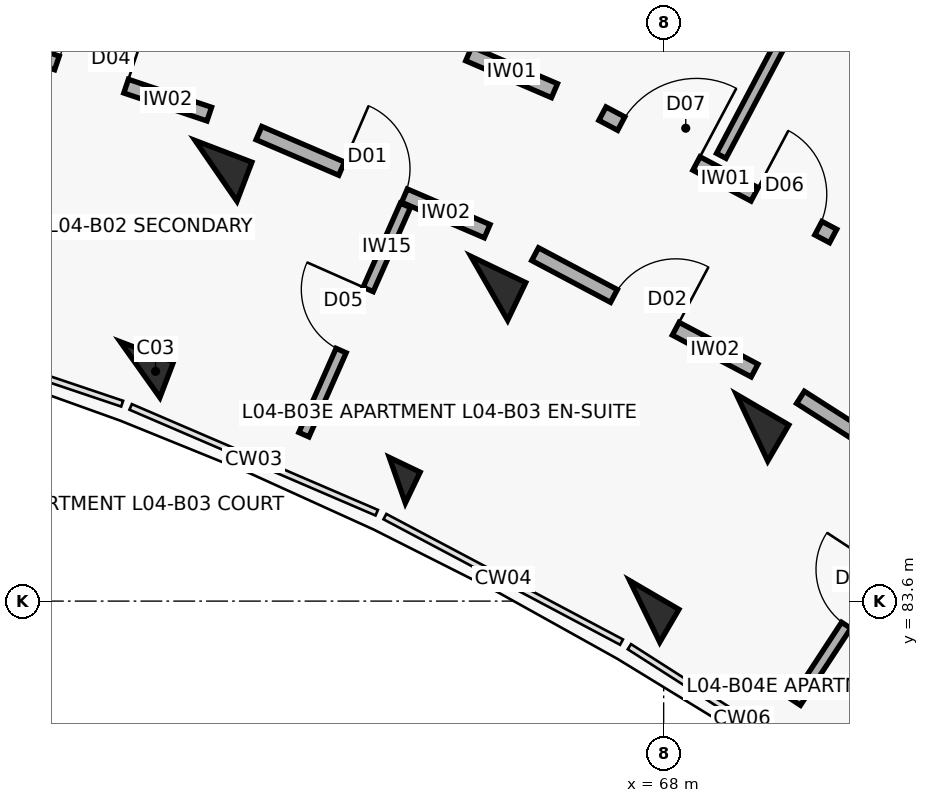
"""IFC4 building model, lengths in metres.
Left out: names, types, materials, properties, quantities, classifications, styles, units other than length and angle.
Written with IfcOpenShell. Run it as: python <this file> out.ifc"""

import sys

from ifc_helpers import new_model, si_unit, direction, frame, frame_2d, origin, origin_2d, place, context, subcontext, project, spatial, rectangle, extrude, element, fill, save


model = new_model("IFC4")
c1 = context("Model", 3, precision=1e-05, world=origin(), true_north=direction((0.0, 1.0)))
c2 = subcontext(c1, "Body", "Model", "MODEL_VIEW")
j1 = project(units=[si_unit("LENGTHUNIT", "METRE"), si_unit("PLANEANGLEUNIT", "RADIAN")], contexts=[c1])
p1 = place(None, origin())
s1 = spatial("IfcSite", under=j1, at=p1, CompositionType="ELEMENT")
p2 = place(p1, origin())
s2 = spatial("IfcBuilding", under=s1, at=p2, CompositionType="ELEMENT")
p3 = place(p2, frame((0.0, 0.0, 14.3)))
s3 = spatial("IfcBuildingStorey", under=s2, at=p3, CompositionType="ELEMENT", Elevation=14.3)
p4 = place(p3, frame((61.111, 86.646, 0.0), z_axis=(0.0, 0.0, 1.0), x_axis=(0.357064076459, 0.934079892355, 0.0)))
e1 = element("IfcColumn", 1, at=p4, inside=s3, PredefinedType="COLUMN", context=c2, shape_type="SweptSolid", body=[
    extrude(rectangle(XDim=0.5, YDim=0.75, at=origin_2d()), origin(), (0.0, 0.0, 1.0), 3.1),
])
p5 = place(p3, frame((62.111, 89.261, 0.0), z_axis=(0.0, 0.0, 1.0), x_axis=(0.357064076459, 0.934079892355, 0.0)))
e2 = element("IfcColumn", 2, at=p5, inside=s3, PredefinedType="COLUMN", context=c2, shape_type="SweptSolid", body=[
    extrude(rectangle(XDim=0.55, YDim=0.8, at=origin_2d()), origin(), (0.0, 0.0, 1.0), 3.1),
])
p6 = place(p3, frame((64.496, 85.191, 0.0), z_axis=(0.0, 0.0, 1.0), x_axis=(0.432085748802, 0.901832526405, 0.0)))
e3 = element("IfcColumn", 3, at=p6, inside=s3, PredefinedType="COLUMN", context=c2, shape_type="SweptSolid", body=[
    extrude(rectangle(XDim=0.45, YDim=0.45, at=origin_2d()), origin(), (0.0, 0.0, 1.0), 3.1),
])
p7 = place(p3, frame((65.706, 87.716, 0.0), z_axis=(0.0, 0.0, 1.0), x_axis=(0.432085748802, 0.901832526405, 0.0)))
e4 = element("IfcColumn", 4, at=p7, inside=s3, PredefinedType="COLUMN", context=c2, shape_type="SweptSolid", body=[
    extrude(rectangle(XDim=0.55, YDim=0.8, at=origin_2d()), origin(), (0.0, 0.0, 1.0), 3.1),
])
p8 = place(p3, frame((67.751, 83.464, 0.0), z_axis=(0.0, 0.0, 1.0), x_axis=(0.504226211181, 0.863571611366, 0.0)))
e5 = element("IfcColumn", 5, at=p8, inside=s3, PredefinedType="COLUMN", context=c2, shape_type="SweptSolid", body=[
    extrude(rectangle(XDim=0.5, YDim=0.75, at=origin_2d()), origin(), (0.0, 0.0, 1.0), 3.1),
])
p9 = place(p3, frame((69.163, 85.882, 0.0), z_axis=(0.0, 0.0, 1.0), x_axis=(0.504226211181, 0.863571611366, 0.0)))
e6 = element("IfcColumn", 6, at=p9, inside=s3, PredefinedType="COLUMN", context=c2, shape_type="SweptSolid", body=[
    extrude(rectangle(XDim=0.55, YDim=0.8, at=origin_2d()), origin(), (0.0, 0.0, 1.0), 3.1),
])
p10 = place(p3, frame((58.923, 91.049, 0.0), z_axis=(0.0, 0.0, 1.0), x_axis=(0.94787351033, -0.318646839643, 0.0)))
e7 = element("IfcWall", 7, at=p10, inside=s3, PredefinedType="SOLIDWALL", context=c2, shape_type="SweptSolid", body=[
    extrude(rectangle(XDim=3.269, YDim=0.19, at=frame_2d((1.634, 0.0))), origin(), (0.0, 0.0, 1.0), 2.08),
])
p11 = place(p10, frame((1.154, 0.0, 0.0)))
e8 = element("IfcOpeningElement", 8, at=p11, cuts=e7, PredefinedType="OPENING", context=c2, shape_type="SweptSolid", body=[
    extrude(rectangle(XDim=0.96, YDim=2.1, at=frame_2d((0.48, 1.05))), frame((0.0, 0.105, 0.0), z_axis=(0.0, -1.0, 0.0), x_axis=(1.0, 0.0, 0.0)), (0.0, 0.0, 1.0), 0.21),
])
p12 = place(p3, frame((63.407, 91.673, 0.0), z_axis=(0.0, 0.0, 1.0), x_axis=(0.918718172399, -0.394913813008, 0.0)))
e9 = element("IfcWall", 9, at=p12, inside=s3, PredefinedType="SOLIDWALL", context=c2, shape_type="SweptSolid", body=[
    extrude(rectangle(XDim=3.436, YDim=0.2, at=frame_2d((1.718, 0.0))), origin(), (0.0, 0.0, 1.0), 2.08),
])
p13 = place(p12, frame((1.228, 0.0, 0.0)))
e10 = element("IfcOpeningElement", 10, at=p13, cuts=e9, PredefinedType="OPENING", context=c2, shape_type="SweptSolid", body=[
    extrude(rectangle(XDim=0.98, YDim=2.15, at=frame_2d((0.49, 1.075))), frame((0.0, 0.11, 0.0), z_axis=(0.0, -1.0, 0.0), x_axis=(1.0, 0.0, 0.0)), (0.0, 0.0, 1.0), 0.22),
])
p14 = place(p3, frame((62.675, 89.758, 0.0), z_axis=(0.0, 0.0, 1.0), x_axis=(0.918723391052, -0.394901672235, 0.0)))
e11 = element("IfcWall", 11, at=p14, inside=s3, PredefinedType="SOLIDWALL", context=c2, shape_type="SweptSolid", body=[
    extrude(rectangle(XDim=3.269, YDim=0.19, at=frame_2d((1.634, 0.0))), origin(), (0.0, 0.0, 1.0), 2.08),
])
p15 = place(p14, frame((1.184, 0.0, 0.0)))
e12 = element("IfcOpeningElement", 12, at=p15, cuts=e11, PredefinedType="OPENING", context=c2, shape_type="SweptSolid", body=[
    extrude(rectangle(XDim=0.9, YDim=2.1, at=frame_2d((0.45, 1.05))), frame((0.0, 0.105, 0.0), z_axis=(0.0, -1.0, 0.0), x_axis=(1.0, 0.0, 0.0)), (0.0, 0.0, 1.0), 0.21),
])
p16 = place(p3, frame((63.267, 85.79, 0.0), z_axis=(0.0, 0.0, 1.0), x_axis=(0.404545283439, 0.91451796792, 0.0)))
e13 = element("IfcWall", 13, at=p16, inside=s3, PredefinedType="PARTITIONING", context=c2, shape_type="SweptSolid", body=[
    extrude(rectangle(XDim=3.3, YDim=0.145, at=frame_2d((1.65, 0.0))), origin(), (0.0, 0.0, 1.0), 2.08),
])
p17 = place(p16, frame((1.21, 0.0, 0.0)))
e14 = element("IfcOpeningElement", 14, at=p17, cuts=e13, PredefinedType="OPENING", context=c2, shape_type="SweptSolid", body=[
    extrude(rectangle(XDim=0.88, YDim=2.1, at=frame_2d((0.44, 1.05))), frame((0.0, 0.083, 0.0), z_axis=(0.0, -1.0, 0.0), x_axis=(1.0, 0.0, 0.0)), (0.0, 0.0, 1.0), 0.165),
])
p18 = place(p3, frame((67.194, 90.014, 0.0), z_axis=(0.0, 0.0, 1.0), x_axis=(0.883410853063, -0.468599258099, 0.0)))
e15 = element("IfcWall", 15, at=p18, inside=s3, PredefinedType="SOLIDWALL", context=c2, shape_type="SweptSolid", body=[
    extrude(rectangle(XDim=3.436, YDim=0.2, at=frame_2d((1.718, 0.0))), origin(), (0.0, 0.0, 1.0), 2.08),
])
p19 = place(p18, frame((0.28, 0.0, 0.0)))
e16 = element("IfcOpeningElement", 16, at=p19, cuts=e15, PredefinedType="OPENING", context=c2, shape_type="SweptSolid", body=[
    extrude(rectangle(XDim=1.12, YDim=2.15, at=frame_2d((0.56, 1.075))), frame((0.0, 0.11, 0.0), z_axis=(0.0, -1.0, 0.0), x_axis=(1.0, 0.0, 0.0)), (0.0, 0.0, 1.0), 0.22),
])
p20 = place(p18, frame((2.266, 0.0, 0.0)))
e17 = element("IfcOpeningElement", 17, at=p20, cuts=e15, PredefinedType="OPENING", context=c2, shape_type="SweptSolid", body=[
    extrude(rectangle(XDim=0.95, YDim=2.1, at=frame_2d((0.475, 1.05))), frame((0.0, 0.11, 0.0), z_axis=(0.0, -1.0, 0.0), x_axis=(1.0, 0.0, 0.0)), (0.0, 0.0, 1.0), 0.22),
])
p21 = place(p3, frame((66.309, 88.165, 0.0), z_axis=(0.0, 0.0, 1.0), x_axis=(0.883444301944, -0.468536194293, 0.0)))
e18 = element("IfcWall", 18, at=p21, inside=s3, PredefinedType="SOLIDWALL", context=c2, shape_type="SweptSolid", body=[
    extrude(rectangle(XDim=3.269, YDim=0.19, at=frame_2d((1.634, 0.0))), origin(), (0.0, 0.0, 1.0), 2.08),
])
p22 = place(p21, frame((1.174, 0.0, 0.0)))
e19 = element("IfcOpeningElement", 19, at=p22, cuts=e18, PredefinedType="OPENING", context=c2, shape_type="SweptSolid", body=[
    extrude(rectangle(XDim=0.92, YDim=2.1, at=frame_2d((0.46, 1.05))), frame((0.0, 0.105, 0.0), z_axis=(0.0, -1.0, 0.0), x_axis=(1.0, 0.0, 0.0)), (0.0, 0.0, 1.0), 0.21),
])
p23 = place(p3, frame((68.758, 89.459, 0.0), z_axis=(0.0, 0.0, 1.0), x_axis=(0.467208910392, 0.884146952746, 0.0)))
e20 = element("IfcWall", 20, at=p23, inside=s3, PredefinedType="PARTITIONING", context=c2, shape_type="SweptSolid", body=[
    extrude(rectangle(XDim=7.95, YDim=0.14, at=frame_2d((3.975, 0.0))), origin(), (0.0, 0.0, 1.0), 2.08),
])
p24 = place(p23, frame((6.05, 0.0, 0.0)))
e21 = element("IfcOpeningElement", 21, at=p24, cuts=e20, PredefinedType="OPENING", context=c2, shape_type="SweptSolid", body=[
    extrude(rectangle(XDim=0.92, YDim=2.1, at=frame_2d((0.46, 1.05))), frame((0.0, 0.08, 0.0), z_axis=(0.0, -1.0, 0.0), x_axis=(1.0, 0.0, 0.0)), (0.0, 0.0, 1.0), 0.16),
])
p25 = place(p3, frame((69.8, 86.281, 0.0), z_axis=(0.0, 0.0, 1.0), x_axis=(0.842225276846, -0.539125758095, 0.0)))
e22 = element("IfcWall", 22, at=p25, inside=s3, PredefinedType="SOLIDWALL", context=c2, shape_type="SweptSolid", body=[
    extrude(rectangle(XDim=3.269, YDim=0.19, at=frame_2d((1.634, 0.0))), origin(), (0.0, 0.0, 1.0), 2.08),
])
p26 = place(p25, frame((1.164, 0.0, 0.0)))
e23 = element("IfcOpeningElement", 23, at=p26, cuts=e22, PredefinedType="OPENING", context=c2, shape_type="SweptSolid", body=[
    extrude(rectangle(XDim=0.94, YDim=2.1, at=frame_2d((0.47, 1.05))), frame((0.0, 0.105, 0.0), z_axis=(0.0, -1.0, 0.0), x_axis=(1.0, 0.0, 0.0)), (0.0, 0.0, 1.0), 0.21),
])
p27 = place(p3, frame((69.739, 82.269, 0.0), z_axis=(0.0, 0.0, 1.0), x_axis=(0.547920940513, 0.836530120765, 0.0)))
e24 = element("IfcWall", 24, at=p27, inside=s3, PredefinedType="PARTITIONING", context=c2, shape_type="SweptSolid", body=[
    extrude(rectangle(XDim=3.3, YDim=0.145, at=frame_2d((1.65, 0.0))), origin(), (0.0, 0.0, 1.0), 2.08),
])
p28 = place(p27, frame((1.21, 0.0, 0.0)))
e25 = element("IfcOpeningElement", 25, at=p28, cuts=e24, PredefinedType="OPENING", context=c2, shape_type="SweptSolid", body=[
    extrude(rectangle(XDim=0.88, YDim=2.1, at=frame_2d((0.44, 1.05))), frame((0.0, 0.083, 0.0), z_axis=(0.0, -1.0, 0.0), x_axis=(1.0, 0.0, 0.0)), (0.0, 0.0, 1.0), 0.165),
])
p29 = place(p11, origin())
e26 = element("IfcDoor", 26, at=p29, inside=s3, OperationType="SINGLE_SWING_RIGHT", PredefinedType="DOOR", context=c2, shape_type="SweptSolid", body=[
    extrude(rectangle(XDim=0.96, YDim=2.1, at=frame_2d((0.48, 1.05))), frame((0.0, 0.025, 0.0), z_axis=(0.0, -1.0, 0.0), x_axis=(1.0, 0.0, 0.0)), (0.0, 0.0, 1.0), 0.05),
])
fill(e8, e26)
p30 = place(p13, origin())
e27 = element("IfcDoor", 27, at=p30, inside=s3, OperationType="SINGLE_SWING_RIGHT", PredefinedType="DOOR", context=c2, shape_type="SweptSolid", body=[
    extrude(rectangle(XDim=0.98, YDim=2.15, at=frame_2d((0.49, 1.075))), frame((0.0, 0.025, 0.0), z_axis=(0.0, -1.0, 0.0), x_axis=(1.0, 0.0, 0.0)), (0.0, 0.0, 1.0), 0.05),
])
fill(e10, e27)
p31 = place(p15, origin())
e28 = element("IfcDoor", 28, at=p31, inside=s3, OperationType="SINGLE_SWING_LEFT", PredefinedType="DOOR", context=c2, shape_type="SweptSolid", body=[
    extrude(rectangle(XDim=0.9, YDim=2.1, at=frame_2d((0.45, 1.05))), frame((0.0, 0.025, 0.0), z_axis=(0.0, -1.0, 0.0), x_axis=(1.0, 0.0, 0.0)), (0.0, 0.0, 1.0), 0.05),
])
fill(e12, e28)
p32 = place(p17, origin())
e29 = element("IfcDoor", 29, at=p32, inside=s3, OperationType="SINGLE_SWING_RIGHT", PredefinedType="DOOR", context=c2, shape_type="SweptSolid", body=[
    extrude(rectangle(XDim=0.88, YDim=2.1, at=frame_2d((0.44, 1.05))), frame((0.0, 0.025, 0.0), z_axis=(0.0, -1.0, 0.0), x_axis=(1.0, 0.0, 0.0)), (0.0, 0.0, 1.0), 0.05),
])
fill(e14, e29)
p33 = place(p19, origin())
e30 = element("IfcDoor", 30, at=p33, inside=s3, OperationType="SINGLE_SWING_RIGHT", PredefinedType="DOOR", context=c2, shape_type="SweptSolid", body=[
    extrude(rectangle(XDim=1.12, YDim=2.15, at=frame_2d((0.56, 1.075))), frame((0.0, 0.025, 0.0), z_axis=(0.0, -1.0, 0.0), x_axis=(1.0, 0.0, 0.0)), (0.0, 0.0, 1.0), 0.05),
])
fill(e16, e30)
p34 = place(p20, origin())
e31 = element("IfcDoor", 31, at=p34, inside=s3, OperationType="SINGLE_SWING_LEFT", PredefinedType="DOOR", context=c2, shape_type="SweptSolid", body=[
    extrude(rectangle(XDim=0.95, YDim=2.1, at=frame_2d((0.475, 1.05))), frame((0.0, 0.025, 0.0), z_axis=(0.0, -1.0, 0.0), x_axis=(1.0, 0.0, 0.0)), (0.0, 0.0, 1.0), 0.05),
])
fill(e17, e31)
p35 = place(p22, origin())
e32 = element("IfcDoor", 32, at=p35, inside=s3, OperationType="SINGLE_SWING_RIGHT", PredefinedType="DOOR", context=c2, shape_type="SweptSolid", body=[
    extrude(rectangle(XDim=0.92, YDim=2.1, at=frame_2d((0.46, 1.05))), frame((0.0, 0.025, 0.0), z_axis=(0.0, -1.0, 0.0), x_axis=(1.0, 0.0, 0.0)), (0.0, 0.0, 1.0), 0.05),
])
fill(e19, e32)
p36 = place(p28, origin())
e33 = element("IfcDoor", 33, at=p36, inside=s3, OperationType="SINGLE_SWING_RIGHT", PredefinedType="DOOR", context=c2, shape_type="SweptSolid", body=[
    extrude(rectangle(XDim=0.88, YDim=2.1, at=frame_2d((0.44, 1.05))), frame((0.0, 0.025, 0.0), z_axis=(0.0, -1.0, 0.0), x_axis=(1.0, 0.0, 0.0)), (0.0, 0.0, 1.0), 0.05),
])
fill(e25, e33)
save(model, sys.argv[1])
